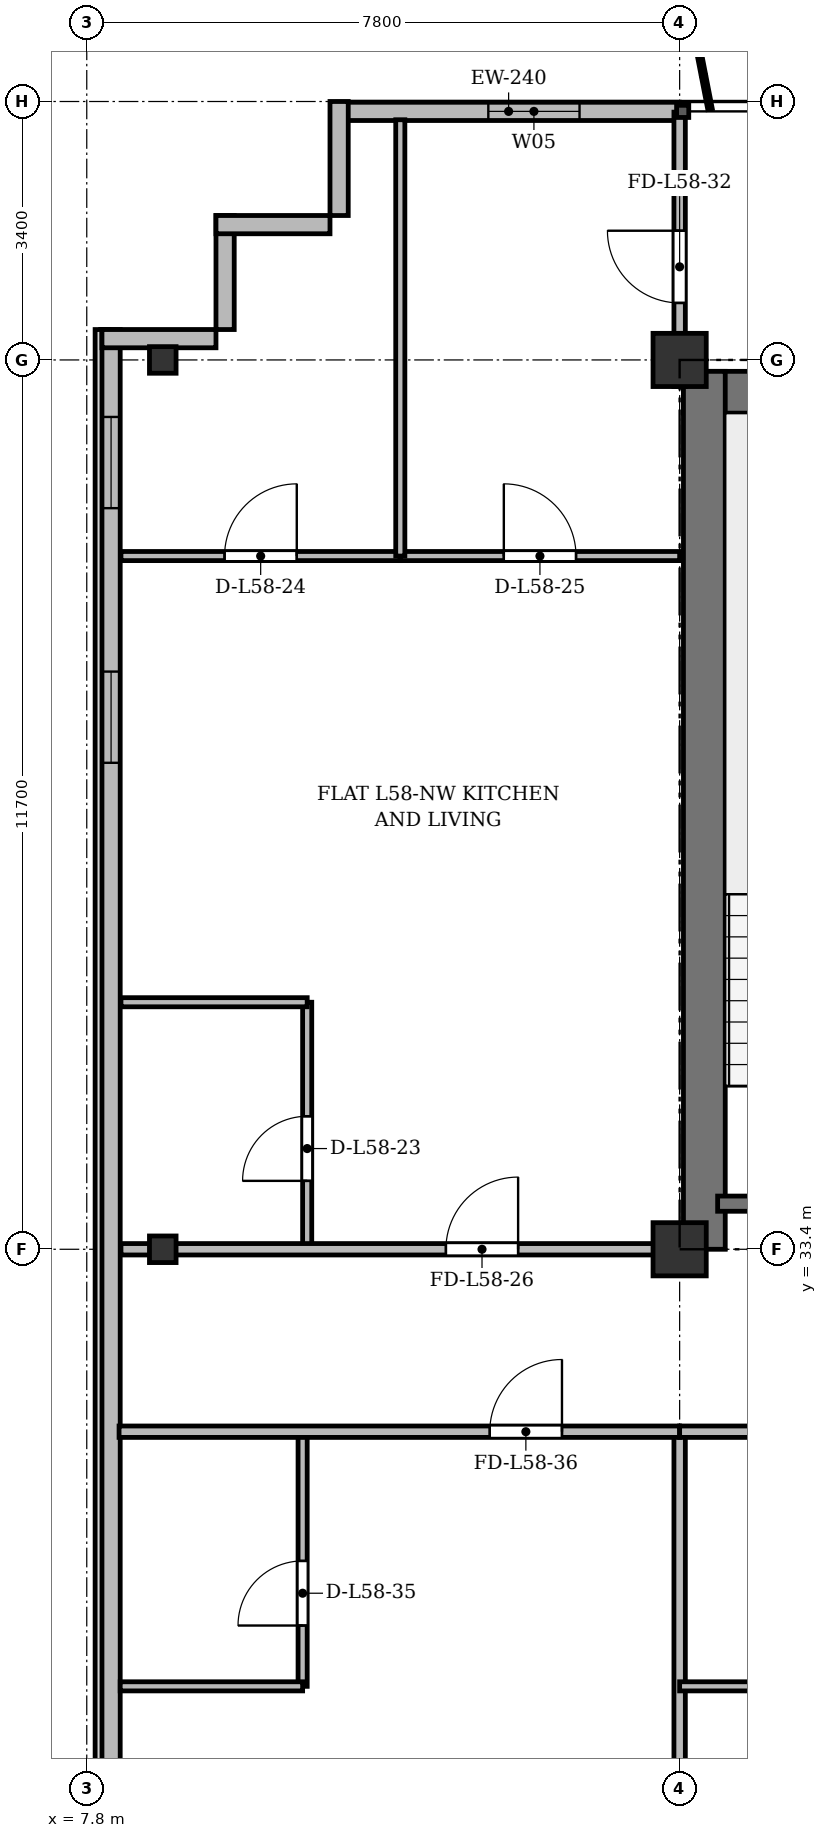
"""IFC4 building model, lengths in metres.
Left out: names, types, materials, properties, quantities, classifications, styles, units other than length and angle.
Written with IfcOpenShell. Run it as: python <this file> out.ifc"""

import sys

from ifc_helpers import new_model, si_unit, direction, frame, frame_2d, origin, origin_2d, place, context, subcontext, project, spatial, rectangle, i_section, extrude, source, transform, mapped, element, fill, save


model = new_model("IFC4")
c1 = context("Model", 3, precision=1e-05, world=origin(), true_north=direction((0.0, 1.0)))
c2 = subcontext(c1, "Body", "Model", "MODEL_VIEW")
j1 = project(units=[si_unit("LENGTHUNIT", "METRE"), si_unit("PLANEANGLEUNIT", "RADIAN")], contexts=[c1])
p1 = place(None, origin())
s1 = spatial("IfcSite", under=j1, at=p1, CompositionType="ELEMENT")
p2 = place(p1, origin())
s2 = spatial("IfcBuilding", under=s1, at=p2, CompositionType="ELEMENT")
p3 = place(p2, frame((0.0, 0.0, 222.9)))
s3 = spatial("IfcBuildingStorey", under=s2, at=p3, CompositionType="ELEMENT", Elevation=222.9)
m1 = source(origin(), c2, "Body", "SweptSolid", [
    extrude(i_section(OverallWidth=0.35, OverallDepth=0.35, WebThickness=0.018, FlangeThickness=0.028, at=origin_2d()), origin(), (0.0, 0.0, 1.0), 3.6),
])
for number, where, z_axis, x_axis in (
    (1, (8.8, 33.4, 0.0), (0.0, 0.0, 1.0), (1.0, 0.0, 0.0)),
    (2, (8.8, 45.1, 0.0), (0.0, 0.0, 1.0), (1.0, 0.0, 0.0)),
):
    element("IfcColumn", number, at=place(p3, frame(where, z_axis=z_axis, x_axis=x_axis)), inside=s3, PredefinedType="COLUMN", context=c2, shape_type="MappedRepresentation", body=[
        mapped(m1, transform((0.0, 0.0, 0.0), x_axis=(1.0, 0.0, 0.0), y_axis=(0.0, 1.0, 0.0), z_axis=(0.0, 0.0, 1.0), scale=1.0)),
    ])
m2 = source(origin(), c2, "Body", "SweptSolid", [
    extrude(rectangle(XDim=0.7, YDim=0.7, at=origin_2d()), origin(), (0.0, 0.0, 1.0), 3.6),
])
for number, where, z_axis, x_axis in (
    (3, (15.6, 33.4, 0.0), (0.0, 0.0, 1.0), (1.0, 0.0, 0.0)),
    (4, (15.6, 45.1, 0.0), (0.0, 0.0, 1.0), (1.0, 0.0, 0.0)),
):
    element("IfcColumn", number, at=place(p3, frame(where, z_axis=z_axis, x_axis=x_axis)), inside=s3, PredefinedType="COLUMN", context=c2, shape_type="MappedRepresentation", body=[
        mapped(m2, transform((0.0, 0.0, 0.0), x_axis=(1.0, 0.0, 0.0), y_axis=(0.0, 1.0, 0.0), z_axis=(0.0, 0.0, 1.0), scale=1.0)),
    ])
p4 = place(p3, frame((11.1, 48.37, 0.0), z_axis=(0.0, 0.0, 1.0), x_axis=(1.0, 0.0, 0.0)))
e5 = element("IfcWall", 5, at=p4, inside=s3, PredefinedType="SOLIDWALL", context=c2, shape_type="SweptSolid", body=[
    extrude(rectangle(XDim=4.5, YDim=0.24, at=frame_2d((2.25, 0.0))), origin(), (0.0, 0.0, 1.0), 3.36),
])
p5 = place(p4, frame((1.983, 0.0, 0.9)))
e6 = element("IfcOpeningElement", 6, at=p5, cuts=e5, PredefinedType="OPENING", context=c2, shape_type="SweptSolid", body=[
    extrude(rectangle(XDim=1.2, YDim=1.65, at=frame_2d((0.6, 0.825))), frame((0.0, 0.13, 0.0), z_axis=(0.0, -1.0, 0.0), x_axis=(1.0, 0.0, 0.0)), (0.0, 0.0, 1.0), 0.26),
])
p6 = place(p3, frame((8.12, 6.4, 0.0), z_axis=(0.0, 0.0, 1.0), x_axis=(0.0, 1.0, 0.0)))
e7 = element("IfcWall", 7, at=p6, inside=s3, PredefinedType="SOLIDWALL", context=c2, shape_type="SweptSolid", body=[
    extrude(rectangle(XDim=39.1, YDim=0.24, at=frame_2d((19.55, 0.0))), origin(), (0.0, 0.0, 1.0), 3.36),
])
p7 = place(p6, frame((1.45, 0.0, 0.92)))
e8 = element("IfcOpeningElement", 8, at=p7, cuts=e7, PredefinedType="OPENING", context=c2, shape_type="SweptSolid", body=[
    extrude(rectangle(XDim=1.2, YDim=1.65, at=frame_2d((0.6, 0.825))), frame((0.0, 0.13, 0.0), z_axis=(0.0, -1.0, 0.0), x_axis=(1.0, 0.0, 0.0)), (0.0, 0.0, 1.0), 0.26),
])
p8 = place(p6, frame((3.7, 0.0, 0.92)))
e9 = element("IfcOpeningElement", 9, at=p8, cuts=e7, PredefinedType="OPENING", context=c2, shape_type="SweptSolid", body=[
    extrude(rectangle(XDim=2.6, YDim=1.9, at=frame_2d((1.3, 0.95))), frame((0.0, 0.13, 0.0), z_axis=(0.0, -1.0, 0.0), x_axis=(1.0, 0.0, 0.0)), (0.0, 0.0, 1.0), 0.26),
])
p9 = place(p6, frame((7.9, 0.0, 0.92)))
e10 = element("IfcOpeningElement", 10, at=p9, cuts=e7, PredefinedType="OPENING", context=c2, shape_type="SweptSolid", body=[
    extrude(rectangle(XDim=2.6, YDim=1.9, at=frame_2d((1.3, 0.95))), frame((0.0, 0.13, 0.0), z_axis=(0.0, -1.0, 0.0), x_axis=(1.0, 0.0, 0.0)), (0.0, 0.0, 1.0), 0.26),
])
p10 = place(p6, frame((15.1, 0.0, 0.92)))
e11 = element("IfcOpeningElement", 11, at=p10, cuts=e7, PredefinedType="OPENING", context=c2, shape_type="SweptSolid", body=[
    extrude(rectangle(XDim=2.6, YDim=1.9, at=frame_2d((1.3, 0.95))), frame((0.0, 0.13, 0.0), z_axis=(0.0, -1.0, 0.0), x_axis=(1.0, 0.0, 0.0)), (0.0, 0.0, 1.0), 0.26),
])
p11 = place(p6, frame((33.4, 0.0, 0.92)))
e12 = element("IfcOpeningElement", 12, at=p11, cuts=e7, PredefinedType="OPENING", context=c2, shape_type="SweptSolid", body=[
    extrude(rectangle(XDim=1.2, YDim=1.65, at=frame_2d((0.6, 0.825))), frame((0.0, 0.13, 0.0), z_axis=(0.0, -1.0, 0.0), x_axis=(1.0, 0.0, 0.0)), (0.0, 0.0, 1.0), 0.26),
])
p12 = place(p6, frame((36.75, 0.0, 0.92)))
e13 = element("IfcOpeningElement", 13, at=p12, cuts=e7, PredefinedType="OPENING", context=c2, shape_type="SweptSolid", body=[
    extrude(rectangle(XDim=1.2, YDim=1.65, at=frame_2d((0.6, 0.825))), frame((0.0, 0.13, 0.0), z_axis=(0.0, -1.0, 0.0), x_axis=(1.0, 0.0, 0.0)), (0.0, 0.0, 1.0), 0.26),
])
for number, where, z_axis, x_axis in (
    (14, (8.0, 45.38, 0.0), (0.0, 0.0, 1.0), (1.0, 0.0, 0.0)),
    (15, (9.62, 45.5, 0.0), (0.0, 0.0, 1.0), (0.0, 1.0, 0.0)),
    (16, (9.5, 46.88, 0.0), (0.0, 0.0, 1.0), (1.0, 0.0, 0.0)),
    (17, (11.12, 47.0, 0.0), (0.0, 0.0, 1.0), (0.0, 1.0, 0.0)),
):
    element("IfcWall", number, at=place(p3, frame(where, z_axis=z_axis, x_axis=x_axis)), inside=s3, PredefinedType="SOLIDWALL", context=c2, shape_type="SweptSolid", body=[
        extrude(rectangle(XDim=1.5, YDim=0.24, at=frame_2d((0.75, 0.0))), origin(), (0.0, 0.0, 1.0), 3.36),
    ])
p13 = place(p3, frame((15.65, 44.675, 0.0), z_axis=(0.0, 0.0, 1.0), x_axis=(1.0, 0.0, 0.0)))
e18 = element("IfcWall", 18, at=p13, inside=s3, PredefinedType="SHEAR", context=c2, shape_type="SweptSolid", body=[
    extrude(rectangle(XDim=43.1, YDim=0.55, at=frame_2d((21.55, 0.0))), origin(), (0.0, 0.0, 1.0), 3.36),
])
p14 = place(p3, frame((15.925, 33.4, 0.0), z_axis=(0.0, 0.0, 1.0), x_axis=(0.0, 1.0, 0.0)))
e19 = element("IfcWall", 19, at=p14, inside=s3, PredefinedType="SHEAR", context=c2, shape_type="SweptSolid", body=[
    extrude(rectangle(XDim=11.55, YDim=0.55, at=frame_2d((5.775, 0.0))), origin(), (0.0, 0.0, 1.0), 3.36),
])
p15 = place(p3, frame((16.1, 34.0, 0.0), z_axis=(0.0, 0.0, 1.0), x_axis=(1.0, 0.0, 0.0)))
e20 = element("IfcWall", 20, at=p15, inside=s3, PredefinedType="SHEAR", context=c2, shape_type="SweptSolid", body=[
    extrude(rectangle(XDim=3.4, YDim=0.2, at=frame_2d((1.7, 0.0))), origin(), (0.0, 0.0, 1.0), 3.36),
])
p16 = place(p3, frame((10.7, 33.4, 0.0), z_axis=(0.0, 0.0, 1.0), x_axis=(0.0, 1.0, 0.0)))
e21 = element("IfcWall", 21, at=p16, inside=s3, PredefinedType="PARTITIONING", context=c2, shape_type="SweptSolid", body=[
    extrude(rectangle(XDim=3.25, YDim=0.12, at=frame_2d((1.625, 0.0))), origin(), (0.0, 0.0, 1.0), 2.91),
])
p17 = place(p16, frame((0.9, 0.0, 0.0)))
e22 = element("IfcOpeningElement", 22, at=p17, cuts=e21, PredefinedType="OPENING", context=c2, shape_type="SweptSolid", body=[
    extrude(rectangle(XDim=0.85, YDim=2.1, at=frame_2d((0.425, 1.05))), frame((0.0, 0.07, 0.0), z_axis=(0.0, -1.0, 0.0), x_axis=(1.0, 0.0, 0.0)), (0.0, 0.0, 1.0), 0.14),
])
p18 = place(p3, frame((8.25, 36.65, 0.0), z_axis=(0.0, 0.0, 1.0), x_axis=(1.0, 0.0, 0.0)))
e23 = element("IfcWall", 23, at=p18, inside=s3, PredefinedType="PARTITIONING", context=c2, shape_type="SweptSolid", body=[
    extrude(rectangle(XDim=2.45, YDim=0.12, at=frame_2d((1.225, 0.0))), origin(), (0.0, 0.0, 1.0), 2.86),
])
p19 = place(p3, frame((8.25, 42.52, 0.0), z_axis=(0.0, 0.0, 1.0), x_axis=(1.0, 0.0, 0.0)))
e24 = element("IfcWall", 24, at=p19, inside=s3, PredefinedType="PARTITIONING", context=c2, shape_type="SweptSolid", body=[
    extrude(rectangle(XDim=3.675, YDim=0.12, at=frame_2d((1.837, 0.0))), origin(), (0.0, 0.0, 1.0), 2.86),
])
p20 = place(p19, frame((1.363, 0.0, 0.0)))
e25 = element("IfcOpeningElement", 25, at=p20, cuts=e24, PredefinedType="OPENING", context=c2, shape_type="SweptSolid", body=[
    extrude(rectangle(XDim=0.95, YDim=2.15, at=frame_2d((0.475, 1.075))), frame((0.0, 0.07, 0.0), z_axis=(0.0, -1.0, 0.0), x_axis=(1.0, 0.0, 0.0)), (0.0, 0.0, 1.0), 0.14),
])
p21 = place(p3, frame((11.925, 42.52, 0.0), z_axis=(0.0, 0.0, 1.0), x_axis=(1.0, 0.0, 0.0)))
e26 = element("IfcWall", 26, at=p21, inside=s3, PredefinedType="PARTITIONING", context=c2, shape_type="SweptSolid", body=[
    extrude(rectangle(XDim=3.675, YDim=0.12, at=frame_2d((1.837, 0.0))), origin(), (0.0, 0.0, 1.0), 2.86),
])
p22 = place(p21, frame((1.362, 0.0, 0.0)))
e27 = element("IfcOpeningElement", 27, at=p22, cuts=e26, PredefinedType="OPENING", context=c2, shape_type="SweptSolid", body=[
    extrude(rectangle(XDim=0.95, YDim=2.15, at=frame_2d((0.475, 1.075))), frame((0.0, 0.07, 0.0), z_axis=(0.0, -1.0, 0.0), x_axis=(1.0, 0.0, 0.0)), (0.0, 0.0, 1.0), 0.14),
])
p23 = place(p3, frame((11.925, 42.52, 0.0), z_axis=(0.0, 0.0, 1.0), x_axis=(0.0, 1.0, 0.0)))
e28 = element("IfcWall", 28, at=p23, inside=s3, PredefinedType="PARTITIONING", context=c2, shape_type="SweptSolid", body=[
    extrude(rectangle(XDim=5.74, YDim=0.12, at=frame_2d((2.87, 0.0))), origin(), (0.0, 0.0, 1.0), 2.91),
])
p24 = place(p3, frame((8.25, 33.4, 0.0), z_axis=(0.0, 0.0, 1.0), x_axis=(1.0, 0.0, 0.0)))
e29 = element("IfcWall", 29, at=p24, inside=s3, PredefinedType="PARTITIONING", context=c2, shape_type="SweptSolid", body=[
    extrude(rectangle(XDim=7.35, YDim=0.15, at=frame_2d((3.675, 0.0))), origin(), (0.0, 0.0, 1.0), 2.91),
])
p25 = place(p24, frame((4.275, 0.0, 0.0)))
e30 = element("IfcOpeningElement", 30, at=p25, cuts=e29, PredefinedType="OPENING", context=c2, shape_type="SweptSolid", body=[
    extrude(rectangle(XDim=0.95, YDim=2.15, at=frame_2d((0.475, 1.075))), frame((0.0, 0.085, 0.0), z_axis=(0.0, -1.0, 0.0), x_axis=(1.0, 0.0, 0.0)), (0.0, 0.0, 1.0), 0.17),
])
p26 = place(p3, frame((15.6, 44.75, 0.0), z_axis=(0.0, 0.0, 1.0), x_axis=(0.0, 1.0, 0.0)))
e31 = element("IfcWall", 31, at=p26, inside=s3, PredefinedType="PARTITIONING", context=c2, shape_type="SweptSolid", body=[
    extrude(rectangle(XDim=3.61, YDim=0.15, at=frame_2d((1.805, 0.0))), origin(), (0.0, 0.0, 1.0), 2.86),
])
p27 = place(p26, frame((1.1, 0.0, 0.0)))
e32 = element("IfcOpeningElement", 32, at=p27, cuts=e31, PredefinedType="OPENING", context=c2, shape_type="SweptSolid", body=[
    extrude(rectangle(XDim=0.95, YDim=2.15, at=frame_2d((0.475, 1.075))), frame((0.0, 0.085, 0.0), z_axis=(0.0, -1.0, 0.0), x_axis=(1.0, 0.0, 0.0)), (0.0, 0.0, 1.0), 0.17),
])
p28 = place(p3, frame((15.6, 3.625, 0.0), z_axis=(0.0, 0.0, 1.0), x_axis=(0.0, 1.0, 0.0)))
e33 = element("IfcWall", 33, at=p28, inside=s3, PredefinedType="PARTITIONING", context=c2, shape_type="SweptSolid", body=[
    extrude(rectangle(XDim=27.375, YDim=0.15, at=frame_2d((13.688, 0.0))), origin(), (0.0, 0.0, 1.0), 2.86),
])
p29 = place(p3, frame((10.64, 27.65, 0.0), z_axis=(0.0, 0.0, 1.0), x_axis=(0.0, 1.0, 0.0)))
e34 = element("IfcWall", 34, at=p29, inside=s3, PredefinedType="PARTITIONING", context=c2, shape_type="SweptSolid", body=[
    extrude(rectangle(XDim=3.35, YDim=0.12, at=frame_2d((1.675, 0.0))), origin(), (0.0, 0.0, 1.0), 3.36),
])
p30 = place(p29, frame((0.8, 0.0, 0.0)))
e35 = element("IfcOpeningElement", 35, at=p30, cuts=e34, PredefinedType="OPENING", context=c2, shape_type="SweptSolid", body=[
    extrude(rectangle(XDim=0.85, YDim=2.1, at=frame_2d((0.425, 1.05))), frame((0.0, 0.07, 0.0), z_axis=(0.0, -1.0, 0.0), x_axis=(1.0, 0.0, 0.0)), (0.0, 0.0, 1.0), 0.14),
])
p31 = place(p3, frame((8.24, 27.65, 0.0), z_axis=(0.0, 0.0, 1.0), x_axis=(1.0, 0.0, 0.0)))
e36 = element("IfcWall", 36, at=p31, inside=s3, PredefinedType="PARTITIONING", context=c2, shape_type="SweptSolid", body=[
    extrude(rectangle(XDim=2.4, YDim=0.12, at=frame_2d((1.2, 0.0))), origin(), (0.0, 0.0, 1.0), 2.86),
])
p32 = place(p3, frame((8.225, 31.0, 0.0), z_axis=(0.0, 0.0, 1.0), x_axis=(1.0, 0.0, 0.0)))
e37 = element("IfcWall", 37, at=p32, inside=s3, PredefinedType="PARTITIONING", context=c2, shape_type="SweptSolid", body=[
    extrude(rectangle(XDim=7.375, YDim=0.15, at=frame_2d((3.688, 0.0))), origin(), (0.0, 0.0, 1.0), 2.86),
])
p33 = place(p32, frame((4.877, 0.0, 0.0)))
e38 = element("IfcOpeningElement", 38, at=p33, cuts=e37, PredefinedType="OPENING", context=c2, shape_type="SweptSolid", body=[
    extrude(rectangle(XDim=0.95, YDim=2.15, at=frame_2d((0.475, 1.075))), frame((0.0, 0.085, 0.0), z_axis=(0.0, -1.0, 0.0), x_axis=(1.0, 0.0, 0.0)), (0.0, 0.0, 1.0), 0.17),
])
p34 = place(p3, frame((15.6, 27.65, 0.0), z_axis=(0.0, 0.0, 1.0), x_axis=(1.0, 0.0, 0.0)))
e39 = element("IfcWall", 39, at=p34, inside=s3, PredefinedType="PARTITIONING", context=c2, shape_type="SweptSolid", body=[
    extrude(rectangle(XDim=2.4, YDim=0.12, at=frame_2d((1.2, 0.0))), origin(), (0.0, 0.0, 1.0), 2.86),
])
p35 = place(p3, frame((15.6, 31.0, 0.0), z_axis=(0.0, 0.0, 1.0), x_axis=(1.0, 0.0, 0.0)))
e40 = element("IfcWall", 40, at=p35, inside=s3, PredefinedType="PARTITIONING", context=c2, shape_type="SweptSolid", body=[
    extrude(rectangle(XDim=7.8, YDim=0.15, at=frame_2d((3.9, 0.0))), origin(), (0.0, 0.0, 1.0), 2.86),
])
p36 = place(p35, frame((5.172, 0.0, 0.0)))
e41 = element("IfcOpeningElement", 41, at=p36, cuts=e40, PredefinedType="OPENING", context=c2, shape_type="SweptSolid", body=[
    extrude(rectangle(XDim=0.95, YDim=2.15, at=frame_2d((0.475, 1.075))), frame((0.0, 0.085, 0.0), z_axis=(0.0, -1.0, 0.0), x_axis=(1.0, 0.0, 0.0)), (0.0, 0.0, 1.0), 0.17),
])
m3 = source(origin(), c2, "Body", "SweptSolid", [
    extrude(rectangle(XDim=1.2, YDim=1.65, at=frame_2d((0.6, 0.825))), frame((0.0, 0.03, 0.0), z_axis=(0.0, -1.0, 0.0), x_axis=(1.0, 0.0, 0.0)), (0.0, 0.0, 1.0), 0.06),
])
p37 = place(p5, origin())
e42 = element("IfcWindow", 42, at=p37, inside=s3, PartitioningType="SINGLE_PANEL", PredefinedType="WINDOW", context=c2, shape_type="MappedRepresentation", body=[
    mapped(m3, transform((0.0, 0.0, 0.0), x_axis=(1.0, 0.0, 0.0), y_axis=(0.0, 1.0, 0.0), z_axis=(0.0, 0.0, 1.0), scale=1.0)),
])
fill(e6, e42)
p38 = place(p11, origin())
e43 = element("IfcWindow", 43, at=p38, inside=s3, PartitioningType="SINGLE_PANEL", PredefinedType="WINDOW", context=c2, shape_type="MappedRepresentation", body=[
    mapped(m3, transform((0.0, 0.0, 0.0), x_axis=(1.0, 0.0, 0.0), y_axis=(0.0, 1.0, 0.0), z_axis=(0.0, 0.0, 1.0), scale=1.0)),
])
fill(e12, e43)
p39 = place(p12, origin())
e44 = element("IfcWindow", 44, at=p39, inside=s3, PartitioningType="SINGLE_PANEL", PredefinedType="WINDOW", context=c2, shape_type="MappedRepresentation", body=[
    mapped(m3, transform((0.0, 0.0, 0.0), x_axis=(1.0, 0.0, 0.0), y_axis=(0.0, 1.0, 0.0), z_axis=(0.0, 0.0, 1.0), scale=1.0)),
])
fill(e13, e44)
m4 = source(origin(), c2, "Body", "SweptSolid", [
    extrude(rectangle(XDim=0.85, YDim=2.1, at=frame_2d((0.425, 1.05))), frame((0.0, 0.025, 0.0), z_axis=(0.0, -1.0, 0.0), x_axis=(1.0, 0.0, 0.0)), (0.0, 0.0, 1.0), 0.05),
])
p40 = place(p17, origin())
e45 = element("IfcDoor", 45, at=p40, inside=s3, OperationType="SINGLE_SWING_LEFT", PredefinedType="DOOR", context=c2, shape_type="MappedRepresentation", body=[
    mapped(m4, transform((0.0, 0.0, 0.0), x_axis=(1.0, 0.0, 0.0), y_axis=(0.0, 1.0, 0.0), z_axis=(0.0, 0.0, 1.0), scale=1.0)),
])
fill(e22, e45)
m5 = source(origin(), c2, "Body", "SweptSolid", [
    extrude(rectangle(XDim=0.95, YDim=2.15, at=frame_2d((0.475, 1.075))), frame((0.0, 0.025, 0.0), z_axis=(0.0, -1.0, 0.0), x_axis=(1.0, 0.0, 0.0)), (0.0, 0.0, 1.0), 0.05),
])
p41 = place(p20, origin())
e46 = element("IfcDoor", 46, at=p41, inside=s3, OperationType="SINGLE_SWING_RIGHT", PredefinedType="DOOR", context=c2, shape_type="MappedRepresentation", body=[
    mapped(m5, transform((0.0, 0.0, 0.0), x_axis=(1.0, 0.0, 0.0), y_axis=(0.0, 1.0, 0.0), z_axis=(0.0, 0.0, 1.0), scale=1.0)),
])
fill(e25, e46)
p42 = place(p22, origin())
e47 = element("IfcDoor", 47, at=p42, inside=s3, OperationType="SINGLE_SWING_LEFT", PredefinedType="DOOR", context=c2, shape_type="MappedRepresentation", body=[
    mapped(m5, transform((0.0, 0.0, 0.0), x_axis=(1.0, 0.0, 0.0), y_axis=(0.0, 1.0, 0.0), z_axis=(0.0, 0.0, 1.0), scale=1.0)),
])
fill(e27, e47)
p43 = place(p25, origin())
e48 = element("IfcDoor", 48, at=p43, inside=s3, OperationType="SINGLE_SWING_RIGHT", PredefinedType="DOOR", context=c2, shape_type="MappedRepresentation", body=[
    mapped(m5, transform((0.0, 0.0, 0.0), x_axis=(1.0, 0.0, 0.0), y_axis=(0.0, 1.0, 0.0), z_axis=(0.0, 0.0, 1.0), scale=1.0)),
])
fill(e30, e48)
p44 = place(p27, origin())
e49 = element("IfcDoor", 49, at=p44, inside=s3, OperationType="SINGLE_SWING_RIGHT", PredefinedType="DOOR", context=c2, shape_type="MappedRepresentation", body=[
    mapped(m5, transform((0.0, 0.0, 0.0), x_axis=(1.0, 0.0, 0.0), y_axis=(0.0, 1.0, 0.0), z_axis=(0.0, 0.0, 1.0), scale=1.0)),
])
fill(e32, e49)
p45 = place(p30, origin())
e50 = element("IfcDoor", 50, at=p45, inside=s3, OperationType="SINGLE_SWING_LEFT", PredefinedType="DOOR", context=c2, shape_type="MappedRepresentation", body=[
    mapped(m4, transform((0.0, 0.0, 0.0), x_axis=(1.0, 0.0, 0.0), y_axis=(0.0, 1.0, 0.0), z_axis=(0.0, 0.0, 1.0), scale=1.0)),
])
fill(e35, e50)
p46 = place(p33, origin())
e51 = element("IfcDoor", 51, at=p46, inside=s3, OperationType="SINGLE_SWING_RIGHT", PredefinedType="DOOR", context=c2, shape_type="MappedRepresentation", body=[
    mapped(m5, transform((0.0, 0.0, 0.0), x_axis=(1.0, 0.0, 0.0), y_axis=(0.0, 1.0, 0.0), z_axis=(0.0, 0.0, 1.0), scale=1.0)),
])
fill(e38, e51)
save(model, sys.argv[1])
